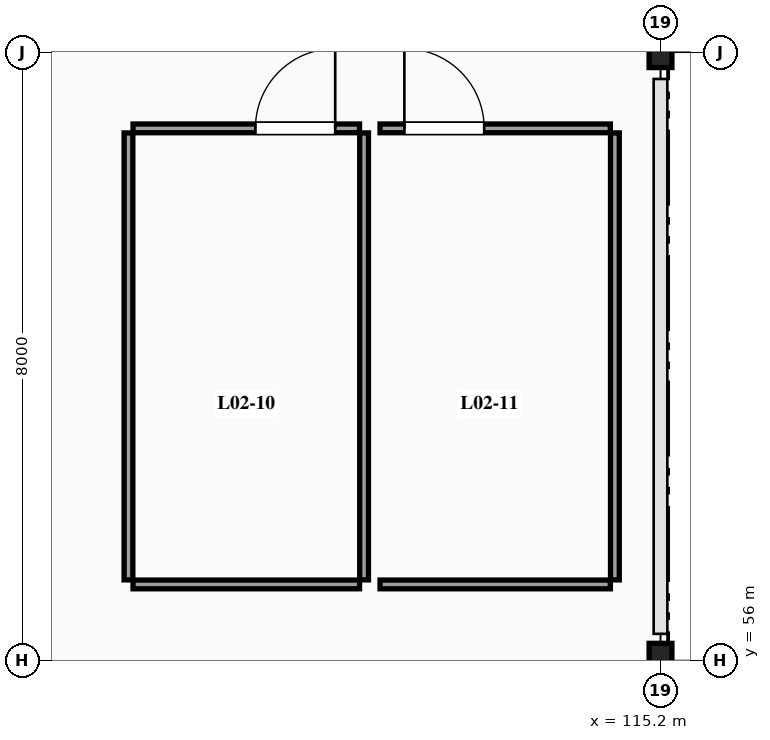
"""IFC4 building model, lengths in metres.
Left out: names, types, materials, properties, quantities, classifications, styles, units other than length and angle.
Written with IfcOpenShell. Run it as: python <this file> out.ifc"""

import sys

from ifc_helpers import new_model, si_unit, direction, frame, frame_2d, origin, origin_2d, place, context, subcontext, project, spatial, rectangle, i_section, extrude, element, fill, save


model = new_model("IFC4")
c1 = context("Model", 3, precision=1e-05, world=origin(), true_north=direction((0.0, 1.0)))
c2 = subcontext(c1, "Body", "Model", "MODEL_VIEW")
j1 = project(units=[si_unit("LENGTHUNIT", "METRE"), si_unit("PLANEANGLEUNIT", "RADIAN")], contexts=[c1])
p1 = place(None, origin())
s1 = spatial("IfcSite", under=j1, at=p1, CompositionType="ELEMENT")
p2 = place(p1, origin())
s2 = spatial("IfcBuilding", under=s1, at=p2, CompositionType="ELEMENT")
p3 = place(p2, frame((0.0, 0.0, 8.7)))
s3 = spatial("IfcBuildingStorey", under=s2, at=p3, CompositionType="ELEMENT", Elevation=8.7)
p4 = place(p3, frame((115.2, 56.0, -0.26), z_axis=(0.0, 0.0, 1.0), x_axis=(1.0, 0.0, 0.0)))
e1 = element("IfcColumn", 1, at=p4, inside=s3, PredefinedType="COLUMN", context=c2, shape_type="SweptSolid", body=[
    extrude(i_section(OverallWidth=0.3, OverallDepth=0.45, WebThickness=0.014, FlangeThickness=0.026, FilletRadius=0.027, at=origin_2d()), origin(), (0.0, 0.0, 1.0), 4.2),
])
p5 = place(p3, frame((115.2, 64.0, -0.26), z_axis=(0.0, 0.0, 1.0), x_axis=(1.0, 0.0, 0.0)))
e2 = element("IfcColumn", 2, at=p5, inside=s3, PredefinedType="COLUMN", context=c2, shape_type="SweptSolid", body=[
    extrude(i_section(OverallWidth=0.3, OverallDepth=0.4, WebThickness=0.013, FlangeThickness=0.024, FilletRadius=0.027, at=origin_2d()), origin(), (0.0, 0.0, 1.0), 4.2),
])
p6 = place(p3, frame((108.26, 63.0, 0.0), z_axis=(0.0, 0.0, 1.0), x_axis=(1.0, 0.0, 0.0)))
e3 = element("IfcWall", 3, at=p6, inside=s3, PredefinedType="PARTITIONING", context=c2, shape_type="SweptSolid", body=[
    extrude(rectangle(XDim=2.98, YDim=0.115, at=frame_2d((1.49, 0.0))), origin(), (0.0, 0.0, 1.0), 3.1),
])
p7 = place(p6, frame((1.61, 0.0, 0.0)))
e4 = element("IfcOpeningElement", 4, at=p7, cuts=e3, PredefinedType="OPENING", context=c2, shape_type="SweptSolid", body=[
    extrude(rectangle(XDim=1.05, YDim=2.15, at=frame_2d((0.525, 1.075))), frame((0.0, 0.067, 0.0), z_axis=(0.0, -1.0, 0.0), x_axis=(1.0, 0.0, 0.0)), (0.0, 0.0, 1.0), 0.135),
])
p8 = place(p3, frame((108.26, 57.0, 0.0), z_axis=(0.0, 0.0, 1.0), x_axis=(1.0, 0.0, 0.0)))
e5 = element("IfcWall", 5, at=p8, inside=s3, PredefinedType="PARTITIONING", context=c2, shape_type="SweptSolid", body=[
    extrude(rectangle(XDim=2.98, YDim=0.115, at=frame_2d((1.49, 0.0))), origin(), (0.0, 0.0, 1.0), 3.1),
])
for number, where, z_axis, x_axis in (
    (6, (108.2, 57.06, 0.0), (0.0, 0.0, 1.0), (0.0, 1.0, 0.0)),
    (7, (111.3, 57.06, 0.0), (0.0, 0.0, 1.0), (0.0, 1.0, 0.0)),
):
    element("IfcWall", number, at=place(p3, frame(where, z_axis=z_axis, x_axis=x_axis)), inside=s3, PredefinedType="PARTITIONING", context=c2, shape_type="SweptSolid", body=[
        extrude(rectangle(XDim=5.88, YDim=0.115, at=frame_2d((2.94, 0.0))), origin(), (0.0, 0.0, 1.0), 3.1),
    ])
p9 = place(p3, frame((111.51, 63.0, 0.0), z_axis=(0.0, 0.0, 1.0), x_axis=(1.0, 0.0, 0.0)))
e8 = element("IfcWall", 8, at=p9, inside=s3, PredefinedType="PARTITIONING", context=c2, shape_type="SweptSolid", body=[
    extrude(rectangle(XDim=3.03, YDim=0.115, at=frame_2d((1.515, 0.0))), origin(), (0.0, 0.0, 1.0), 3.1),
])
p10 = place(p9, frame((0.32, 0.0, 0.0)))
e9 = element("IfcOpeningElement", 9, at=p10, cuts=e8, PredefinedType="OPENING", context=c2, shape_type="SweptSolid", body=[
    extrude(rectangle(XDim=1.05, YDim=2.15, at=frame_2d((0.525, 1.075))), frame((0.0, 0.067, 0.0), z_axis=(0.0, -1.0, 0.0), x_axis=(1.0, 0.0, 0.0)), (0.0, 0.0, 1.0), 0.135),
])
p11 = place(p3, frame((111.51, 57.0, 0.0), z_axis=(0.0, 0.0, 1.0), x_axis=(1.0, 0.0, 0.0)))
e10 = element("IfcWall", 10, at=p11, inside=s3, PredefinedType="PARTITIONING", context=c2, shape_type="SweptSolid", body=[
    extrude(rectangle(XDim=3.03, YDim=0.115, at=frame_2d((1.515, 0.0))), origin(), (0.0, 0.0, 1.0), 3.1),
])
p12 = place(p3, frame((114.6, 57.06, 0.0), z_axis=(0.0, 0.0, 1.0), x_axis=(0.0, 1.0, 0.0)))
e11 = element("IfcWall", 11, at=p12, inside=s3, PredefinedType="PARTITIONING", context=c2, shape_type="SweptSolid", body=[
    extrude(rectangle(XDim=5.88, YDim=0.115, at=frame_2d((2.94, 0.0))), origin(), (0.0, 0.0, 1.0), 3.1),
])
p13 = place(p7, origin())
e12 = element("IfcDoor", 12, at=p13, inside=s3, OperationType="SINGLE_SWING_RIGHT", PredefinedType="DOOR", context=c2, shape_type="SweptSolid", body=[
    extrude(rectangle(XDim=1.05, YDim=2.15, at=frame_2d((0.525, 1.075))), frame((0.0, 0.025, 0.0), z_axis=(0.0, -1.0, 0.0), x_axis=(1.0, 0.0, 0.0)), (0.0, 0.0, 1.0), 0.05),
])
fill(e4, e12)
p14 = place(p10, origin())
e13 = element("IfcDoor", 13, at=p14, inside=s3, OperationType="SINGLE_SWING_LEFT", PredefinedType="DOOR", context=c2, shape_type="SweptSolid", body=[
    extrude(rectangle(XDim=1.05, YDim=2.15, at=frame_2d((0.525, 1.075))), frame((0.0, 0.025, 0.0), z_axis=(0.0, -1.0, 0.0), x_axis=(1.0, 0.0, 0.0)), (0.0, 0.0, 1.0), 0.05),
])
fill(e9, e13)
save(model, sys.argv[1])
